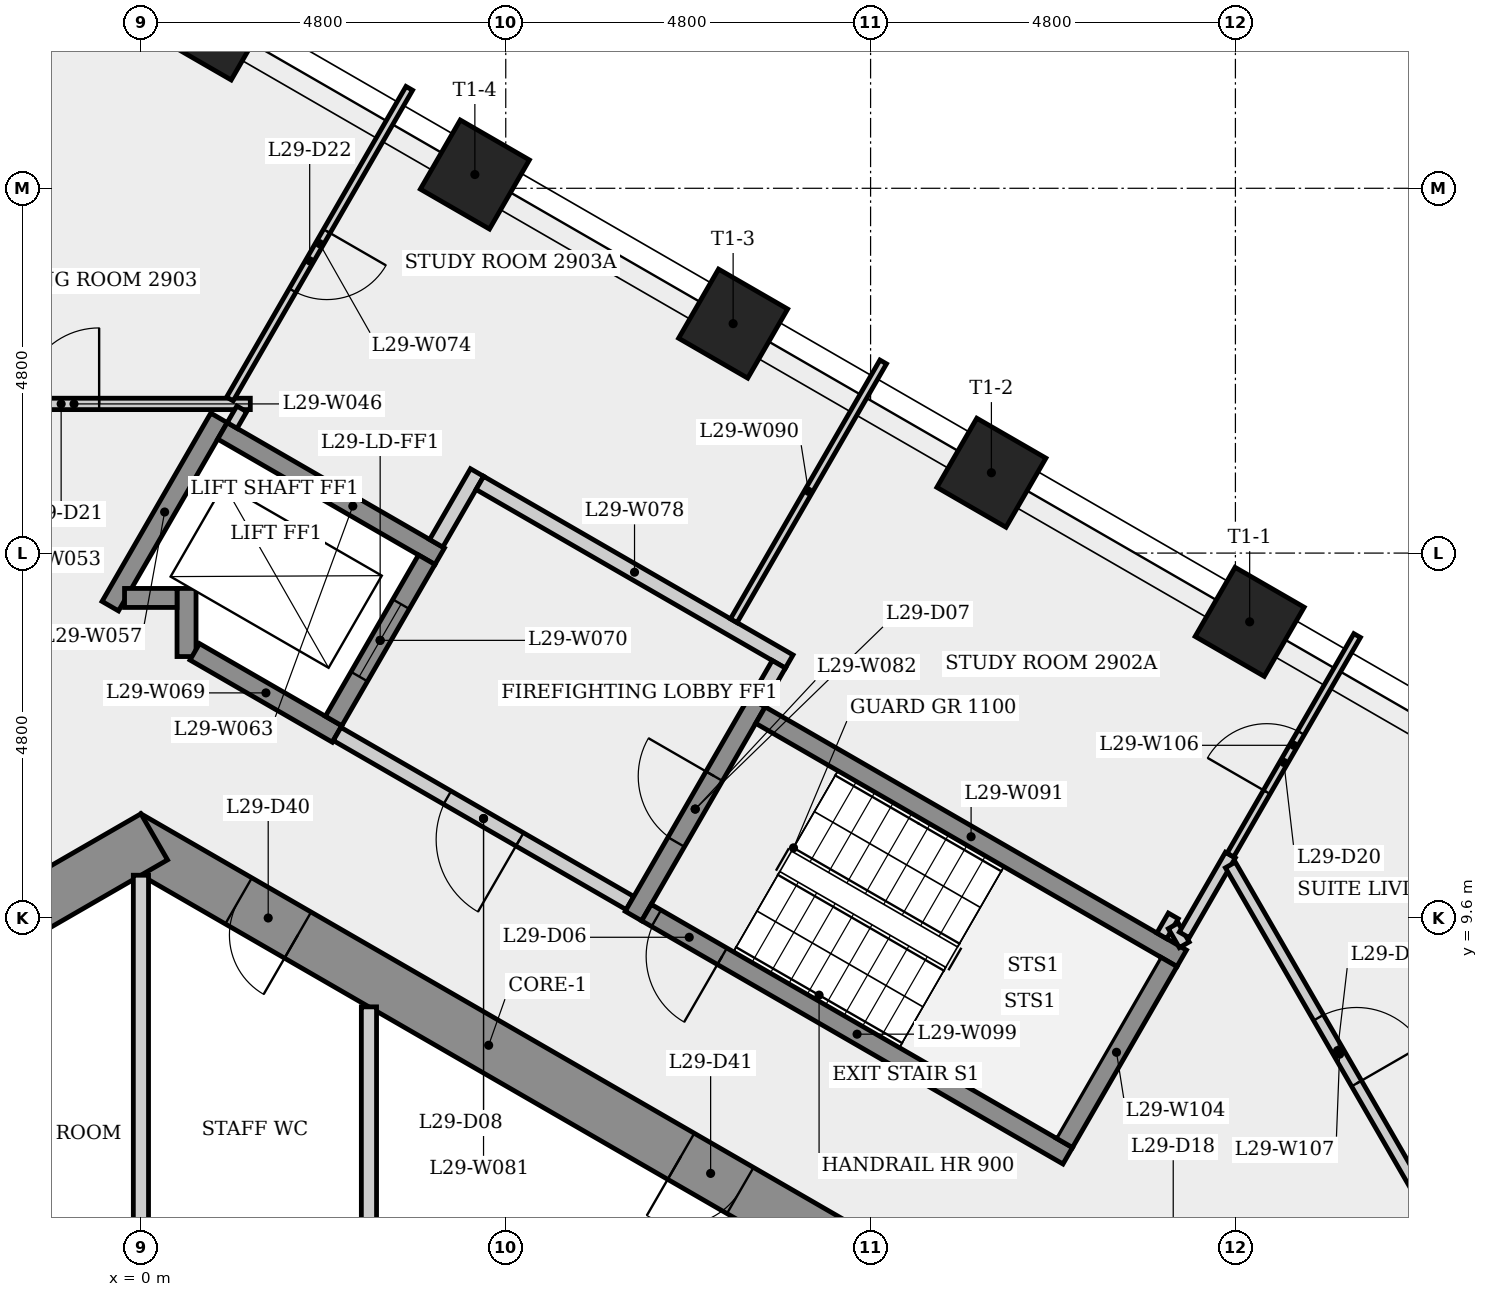
"""IFC4 building model, lengths in metres.
Left out: names, types, materials, properties, quantities, classifications, styles, units other than length and angle.
Written with IfcOpenShell. Run it as: python <this file> out.ifc"""

import sys

from ifc_helpers import new_model, si_unit, direction, frame, frame_2d, origin, origin_2d, place, context, subcontext, project, spatial, rectangle, extrude, element, fill, save


model = new_model("IFC4")
c1 = context("Model", 3, precision=1e-05, world=origin(), true_north=direction((0.0, 1.0)))
c2 = subcontext(c1, "Body", "Model", "MODEL_VIEW")
j1 = project(units=[si_unit("LENGTHUNIT", "METRE"), si_unit("PLANEANGLEUNIT", "RADIAN")], contexts=[c1])
p1 = place(None, origin())
s1 = spatial("IfcSite", under=j1, at=p1, CompositionType="ELEMENT")
p2 = place(p1, origin())
s2 = spatial("IfcBuilding", under=s1, at=p2, CompositionType="ELEMENT")
p3 = place(p2, frame((0.0, 0.0, 110.3)))
s3 = spatial("IfcBuildingStorey", under=s2, at=p3, CompositionType="ELEMENT", Elevation=110.3)
p4 = place(p3, frame((9.325, 5.182, 0.0), z_axis=(0.0, 0.0, 1.0), x_axis=(-0.866023993627, 0.500002442456, 0.0)))
e1 = element("IfcWall", 1, at=p4, inside=s3, PredefinedType="SHEAR", context=c2, shape_type="SweptSolid", body=[
    extrude(rectangle(XDim=10.97, YDim=0.7, at=frame_2d((5.485, 0.0))), origin(), (0.0, 0.0, 1.0), 3.4),
])
p5 = place(p4, frame((8.384, 0.0, 0.0)))
e2 = element("IfcOpeningElement", 2, at=p5, cuts=e1, PredefinedType="OPENING", context=c2, shape_type="SweptSolid", body=[
    extrude(rectangle(XDim=0.9, YDim=2.1, at=frame_2d((0.45, 1.05))), frame((0.0, 0.36, 0.0), z_axis=(0.0, -1.0, 0.0), x_axis=(1.0, 0.0, 0.0)), (0.0, 0.0, 1.0), 0.72),
])
p6 = place(p4, frame((1.663, 0.0, 0.0)))
e3 = element("IfcOpeningElement", 3, at=p6, cuts=e1, PredefinedType="OPENING", context=c2, shape_type="SweptSolid", body=[
    extrude(rectangle(XDim=0.9, YDim=2.1, at=frame_2d((0.45, 1.05))), frame((0.0, 0.36, 0.0), z_axis=(0.0, -1.0, 0.0), x_axis=(1.0, 0.0, 0.0)), (0.0, 0.0, 1.0), 0.72),
])
p7 = place(p3, frame((0.175, 10.667, 0.0), z_axis=(0.0, 0.0, 1.0), x_axis=(-0.866023993627, -0.500002442456, 0.0)))
e4 = element("IfcWall", 4, at=p7, inside=s3, PredefinedType="SHEAR", context=c2, shape_type="SweptSolid", body=[
    extrude(rectangle(XDim=10.97, YDim=0.7, at=frame_2d((5.485, 0.0))), origin(), (0.0, 0.0, 1.0), 3.4),
])
p8 = place(p7, frame((7.923, 0.0, 0.0)))
e5 = element("IfcOpeningElement", 5, at=p8, cuts=e4, PredefinedType="OPENING", context=c2, shape_type="SweptSolid", body=[
    extrude(rectangle(XDim=0.9, YDim=2.1, at=frame_2d((0.45, 1.05))), frame((0.0, 0.36, 0.0), z_axis=(0.0, -1.0, 0.0), x_axis=(1.0, 0.0, 0.0)), (0.0, 0.0, 1.0), 0.72),
])
p9 = place(p7, frame((1.802, 0.0, 0.0)))
e6 = element("IfcOpeningElement", 6, at=p9, cuts=e4, PredefinedType="OPENING", context=c2, shape_type="SweptSolid", body=[
    extrude(rectangle(XDim=0.9, YDim=2.1, at=frame_2d((0.45, 1.05))), frame((0.0, 0.36, 0.0), z_axis=(0.0, -1.0, 0.0), x_axis=(1.0, 0.0, 0.0)), (0.0, 0.0, 1.0), 0.72),
])
for number, where, z_axis, x_axis in (
    (7, (14.588, 13.495, 0.0), (0.0, 0.0, 1.0), (0.5, 0.866, 0.0)),
    (8, (11.189, 15.457, 0.0), (0.0, 0.0, 1.0), (0.5, 0.866, 0.0)),
    (9, (7.792, 17.419, 0.0), (0.0, 0.0, 1.0), (0.5, 0.866, 0.0)),
    (10, (4.394, 19.381, 0.0), (0.0, 0.0, 1.0), (0.5, 0.866, 0.0)),
    (11, (0.996, 21.343, 0.0), (0.0, 0.0, 1.0), (0.5, 0.866, 0.0)),
):
    element("IfcColumn", number, at=place(p3, frame(where, z_axis=z_axis, x_axis=x_axis)), inside=s3, PredefinedType="COLUMN", context=c2, shape_type="SweptSolid", body=[
        extrude(rectangle(XDim=1.05, YDim=1.05, at=origin_2d()), origin(), (0.0, 0.0, 1.0), 3.4),
    ])
p10 = place(p3, frame((-3.2, 16.363, 0.0), z_axis=(0.0, 0.0, 1.0), x_axis=(1.0, 0.0, 0.0)))
e12 = element("IfcWall", 12, at=p10, inside=s3, PredefinedType="PARTITIONING", context=c2, shape_type="SweptSolid", body=[
    extrude(rectangle(XDim=4.639, YDim=0.15, at=frame_2d((2.32, 0.0))), origin(), (0.0, 0.0, 1.0), 3.05),
])
p11 = place(p10, frame((1.65, 0.0, 0.0)))
e13 = element("IfcOpeningElement", 13, at=p11, cuts=e12, PredefinedType="OPENING", context=c2, shape_type="SweptSolid", body=[
    extrude(rectangle(XDim=1.0, YDim=2.1, at=frame_2d((0.5, 1.05))), frame((0.0, 0.085, 0.0), z_axis=(0.0, -1.0, 0.0), x_axis=(1.0, 0.0, 0.0)), (0.0, 0.0, 1.0), 0.17),
])
p12 = place(p3, frame((-0.403, 13.702, 0.0), z_axis=(0.0, 0.0, 1.0), x_axis=(0.499976111731, 0.866039195244, 0.0)))
e14 = element("IfcWall", 14, at=p12, inside=s3, PredefinedType="SHEAR", context=c2, shape_type="SweptSolid", body=[
    extrude(rectangle(XDim=2.861, YDim=0.25, at=frame_2d((1.43, 0.0))), origin(), (0.0, 0.0, 1.0), 3.05),
])
p13 = place(p3, frame((0.0, 10.161, 0.0), z_axis=(0.0, 0.0, 1.0), x_axis=(0.0, -1.0, 0.0)))
e15 = element("IfcWall", 15, at=p13, inside=s3, PredefinedType="PARTITIONING", context=c2, shape_type="SweptSolid", body=[
    extrude(rectangle(XDim=4.886, YDim=0.2, at=frame_2d((2.443, 0.0))), origin(), (0.0, 0.0, 1.0), 3.05),
])
p14 = place(p3, frame((0.6, 13.039, 0.0), z_axis=(0.0, 0.0, 1.0), x_axis=(0.0, 1.0, 0.0)))
e16 = element("IfcWall", 16, at=p14, inside=s3, PredefinedType="SHEAR", context=c2, shape_type="SweptSolid", body=[
    extrude(rectangle(XDim=0.896, YDim=0.25, at=frame_2d((0.448, 0.0))), origin(), (0.0, 0.0, 1.0), 3.05),
])
p15 = place(p3, frame((0.475, 13.81, 0.0), z_axis=(0.0, 0.0, 1.0), x_axis=(-1.0, 0.0, 0.0)))
e17 = element("IfcWall", 17, at=p15, inside=s3, PredefinedType="SHEAR", context=c2, shape_type="SweptSolid", body=[
    extrude(rectangle(XDim=0.691, YDim=0.25, at=frame_2d((0.345, 0.0))), origin(), (0.0, 0.0, 1.0), 3.4),
])
p16 = place(p3, frame((1.073, 16.008, 0.0), z_axis=(0.0, 0.0, 1.0), x_axis=(0.866040211805, -0.499974350878, 0.0)))
e18 = element("IfcWall", 18, at=p16, inside=s3, PredefinedType="SHEAR", context=c2, shape_type="SweptSolid", body=[
    extrude(rectangle(XDim=3.3, YDim=0.25, at=frame_2d((1.65, 0.0))), origin(), (0.0, 0.0, 1.0), 3.05),
])
p17 = place(p3, frame((1.327, 16.298, 0.0), z_axis=(0.0, 0.0, 1.0), x_axis=(-0.500502949238, -0.865734831114, 0.0)))
e19 = element("IfcWall", 19, at=p17, inside=s3, PredefinedType="PARTITIONING", context=c2, shape_type="SweptSolid", body=[
    extrude(rectangle(XDim=0.253, YDim=0.15, at=frame_2d((0.126, 0.0))), origin(), (0.0, 0.0, 1.0), 3.05),
])
p18 = place(p3, frame((2.581, 12.02, 0.0), z_axis=(0.0, 0.0, 1.0), x_axis=(-0.86603892542, 0.499976579108, 0.0)))
e20 = element("IfcWall", 20, at=p18, inside=s3, PredefinedType="SHEAR", context=c2, shape_type="SweptSolid", body=[
    extrude(rectangle(XDim=2.162, YDim=0.25, at=frame_2d((1.081, 0.0))), origin(), (0.0, 0.0, 1.0), 3.05),
])
p19 = place(p3, frame((2.535, 12.191, 0.0), z_axis=(0.0, 0.0, 1.0), x_axis=(0.500061746146, 0.865989751695, 0.0)))
e21 = element("IfcWall", 21, at=p19, inside=s3, PredefinedType="SHEAR", context=c2, shape_type="SweptSolid", body=[
    extrude(rectangle(XDim=2.45, YDim=0.25, at=frame_2d((1.225, 0.0))), origin(), (0.0, 0.0, 1.0), 3.4),
])
p20 = place(p19, frame((0.675, 0.0, 0.0)))
e22 = element("IfcOpeningElement", 22, at=p20, cuts=e21, PredefinedType="OPENING", context=c2, shape_type="SweptSolid", body=[
    extrude(rectangle(XDim=1.1, YDim=2.1, at=frame_2d((0.55, 1.05))), frame((0.0, 0.135, 0.0), z_axis=(0.0, -1.0, 0.0), x_axis=(1.0, 0.0, 0.0)), (0.0, 0.0, 1.0), 0.27),
])
p21 = place(p3, frame((3.0, 8.429, 0.0), z_axis=(0.0, 0.0, 1.0), x_axis=(0.0, -1.0, 0.0)))
e23 = element("IfcWall", 23, at=p21, inside=s3, PredefinedType="PARTITIONING", context=c2, shape_type="SweptSolid", body=[
    extrude(rectangle(XDim=3.154, YDim=0.2, at=frame_2d((1.577, 0.0))), origin(), (0.0, 0.0, 1.0), 3.05),
])
p22 = place(p3, frame((3.531, 20.515, 0.0), z_axis=(0.0, 0.0, 1.0), x_axis=(-0.500022469165, -0.866012430818, 0.0)))
e24 = element("IfcWall", 24, at=p22, inside=s3, PredefinedType="PARTITIONING", context=c2, shape_type="SweptSolid", body=[
    extrude(rectangle(XDim=4.719, YDim=0.1, at=frame_2d((2.36, 0.0))), origin(), (0.0, 0.0, 1.0), 3.05),
])
p23 = place(p22, frame((2.17, 0.0, 0.0)))
e25 = element("IfcOpeningElement", 25, at=p23, cuts=e24, PredefinedType="OPENING", context=c2, shape_type="SweptSolid", body=[
    extrude(rectangle(XDim=0.9, YDim=2.1, at=frame_2d((0.45, 1.05))), frame((0.0, 0.06, 0.0), z_axis=(0.0, -1.0, 0.0), x_axis=(1.0, 0.0, 0.0)), (0.0, 0.0, 1.0), 0.12),
])
p24 = place(p3, frame((3.885, 14.529, 0.0), z_axis=(0.0, 0.0, 1.0), x_axis=(0.499997628298, 0.866026773083, 0.0)))
e26 = element("IfcWall", 26, at=p24, inside=s3, PredefinedType="PARTITIONING", context=c2, shape_type="SweptSolid", body=[
    extrude(rectangle(XDim=1.075, YDim=0.2, at=frame_2d((0.538, 0.0))), origin(), (0.0, 0.0, 1.0), 3.05),
])
p25 = place(p3, frame((4.459, 15.323, 0.0), z_axis=(0.0, 0.0, 1.0), x_axis=(0.866016039709, -0.500016218704, 0.0)))
e27 = element("IfcWall", 27, at=p25, inside=s3, PredefinedType="PARTITIONING", context=c2, shape_type="SweptSolid", body=[
    extrude(rectangle(XDim=4.7, YDim=0.2, at=frame_2d((2.35, 0.0))), origin(), (0.0, 0.0, 1.0), 3.05),
])
p26 = place(p3, frame((6.435, 9.795, 0.0), z_axis=(0.0, 0.0, 1.0), x_axis=(-0.866012907634, 0.500021643343, 0.0)))
e28 = element("IfcWall", 28, at=p26, inside=s3, PredefinedType="PARTITIONING", context=c2, shape_type="SweptSolid", body=[
    extrude(rectangle(XDim=4.45, YDim=0.2, at=frame_2d((2.225, 0.0))), origin(), (0.0, 0.0, 1.0), 3.05),
])
p27 = place(p26, frame((1.675, 0.0, 0.0)))
e29 = element("IfcOpeningElement", 29, at=p27, cuts=e28, PredefinedType="OPENING", context=c2, shape_type="SweptSolid", body=[
    extrude(rectangle(XDim=1.1, YDim=2.1, at=frame_2d((0.55, 1.05))), frame((0.0, 0.11, 0.0), z_axis=(0.0, -1.0, 0.0), x_axis=(1.0, 0.0, 0.0)), (0.0, 0.0, 1.0), 0.22),
])
p28 = place(p3, frame((6.48, 9.624, 0.0), z_axis=(0.0, 0.0, 1.0), x_axis=(0.500017246033, 0.866015446554, 0.0)))
e30 = element("IfcWall", 30, at=p28, inside=s3, PredefinedType="SHEAR", context=c2, shape_type="SweptSolid", body=[
    extrude(rectangle(XDim=3.25, YDim=0.25, at=frame_2d((1.625, 0.0))), origin(), (0.0, 0.0, 1.0), 3.05),
])
p29 = place(p28, frame((1.125, 0.0, 0.0)))
e31 = element("IfcOpeningElement", 31, at=p29, cuts=e30, PredefinedType="OPENING", context=c2, shape_type="SweptSolid", body=[
    extrude(rectangle(XDim=1.0, YDim=2.1, at=frame_2d((0.5, 1.05))), frame((0.0, 0.135, 0.0), z_axis=(0.0, -1.0, 0.0), x_axis=(1.0, 0.0, 0.0)), (0.0, 0.0, 1.0), 0.27),
])
p30 = place(p3, frame((7.8, 13.51, 0.0), z_axis=(0.0, 0.0, 1.0), x_axis=(0.499985832843, 0.866033583042, 0.0)))
e32 = element("IfcWall", 32, at=p30, inside=s3, PredefinedType="PARTITIONING", context=c2, shape_type="SweptSolid", body=[
    extrude(rectangle(XDim=3.932, YDim=0.1, at=frame_2d((1.966, 0.0))), origin(), (0.0, 0.0, 1.0), 3.05),
])
p31 = place(p3, frame((8.151, 12.268, 0.0), z_axis=(0.0, 0.0, 1.0), x_axis=(0.866025499775, -0.499999833739, 0.0)))
e33 = element("IfcWall", 33, at=p31, inside=s3, PredefinedType="SHEAR", context=c2, shape_type="SweptSolid", body=[
    extrude(rectangle(XDim=6.4, YDim=0.25, at=frame_2d((3.2, 0.0))), origin(), (0.0, 0.0, 1.0), 3.05),
])
p32 = place(p3, frame((8.393, 12.937, 0.0), z_axis=(0.0, 0.0, 1.0), x_axis=(-0.500065409566, -0.86598763626, 0.0)))
e34 = element("IfcWall", 34, at=p32, inside=s3, PredefinedType="PARTITIONING", context=c2, shape_type="SweptSolid", body=[
    extrude(rectangle(XDim=0.575, YDim=0.2, at=frame_2d((0.288, 0.0))), origin(), (0.0, 0.0, 1.0), 3.05),
])
p33 = place(p3, frame((12.194, 6.47, 0.0), z_axis=(0.0, 0.0, 1.0), x_axis=(-0.866025499775, 0.499999833739, 0.0)))
e35 = element("IfcWall", 35, at=p33, inside=s3, PredefinedType="SHEAR", context=c2, shape_type="SweptSolid", body=[
    extrude(rectangle(XDim=6.4, YDim=0.25, at=frame_2d((3.2, 0.0))), origin(), (0.0, 0.0, 1.0), 3.05),
])
p34 = place(p33, frame((5.25, 0.0, 0.0)))
e36 = element("IfcOpeningElement", 36, at=p34, cuts=e35, PredefinedType="OPENING", context=c2, shape_type="SweptSolid", body=[
    extrude(rectangle(XDim=1.0, YDim=2.1, at=frame_2d((0.5, 1.05))), frame((0.0, 0.135, 0.0), z_axis=(0.0, -1.0, 0.0), x_axis=(1.0, 0.0, 0.0)), (0.0, 0.0, 1.0), 0.27),
])
p35 = place(p3, frame((13.431, 9.364, 0.0), z_axis=(0.0, 0.0, 1.0), x_axis=(0.49995513091, 0.866051307416, 0.0)))
e37 = element("IfcWall", 37, at=p35, inside=s3, PredefinedType="PARTITIONING", context=c2, shape_type="SweptSolid", body=[
    extrude(rectangle(XDim=0.303, YDim=0.15, at=frame_2d((0.151, 0.0))), origin(), (0.0, 0.0, 1.0), 3.05),
])
p36 = place(p3, frame((13.583, 9.496, 0.0), z_axis=(0.0, 0.0, 1.0), x_axis=(0.499868889286, -0.866101087359, 0.0)))
e38 = element("IfcWall", 38, at=p36, inside=s3, PredefinedType="PARTITIONING", context=c2, shape_type="SweptSolid", body=[
    extrude(rectangle(XDim=0.289, YDim=0.15, at=frame_2d((0.144, 0.0))), origin(), (0.0, 0.0, 1.0), 3.05),
])
p37 = place(p3, frame((13.523, 9.022, 0.0), z_axis=(0.0, 0.0, 1.0), x_axis=(-0.500034990121, -0.866005201286, 0.0)))
e39 = element("IfcWall", 39, at=p37, inside=s3, PredefinedType="SHEAR", context=c2, shape_type="SweptSolid", body=[
    extrude(rectangle(XDim=2.75, YDim=0.25, at=frame_2d((1.375, 0.0))), origin(), (0.0, 0.0, 1.0), 3.05),
])
p38 = place(p3, frame((13.727, 9.376, 0.0), z_axis=(0.0, 0.0, 1.0), x_axis=(0.500012742938, 0.866018046521, 0.0)))
e40 = element("IfcWall", 40, at=p38, inside=s3, PredefinedType="PARTITIONING", context=c2, shape_type="SweptSolid", body=[
    extrude(rectangle(XDim=1.213, YDim=0.15, at=frame_2d((0.607, 0.0))), origin(), (0.0, 0.0, 1.0), 3.05),
])
p39 = place(p3, frame((14.334, 10.427, 0.0), z_axis=(0.0, 0.0, 1.0), x_axis=(0.499997052475, 0.866027105532, 0.0)))
e41 = element("IfcWall", 41, at=p39, inside=s3, PredefinedType="PARTITIONING", context=c2, shape_type="SweptSolid", body=[
    extrude(rectangle(XDim=3.335, YDim=0.1, at=frame_2d((1.667, 0.0))), origin(), (0.0, 0.0, 1.0), 3.05),
])
p40 = place(p39, frame((0.957, 0.0, 0.0)))
e42 = element("IfcOpeningElement", 42, at=p40, cuts=e41, PredefinedType="OPENING", context=c2, shape_type="SweptSolid", body=[
    extrude(rectangle(XDim=0.9, YDim=2.1, at=frame_2d((0.45, 1.05))), frame((0.0, 0.06, 0.0), z_axis=(0.0, -1.0, 0.0), x_axis=(1.0, 0.0, 0.0)), (0.0, 0.0, 1.0), 0.12),
])
p41 = place(p3, frame((14.334, 10.297, 0.0), z_axis=(0.0, 0.0, 1.0), x_axis=(0.500006661652, -0.866021557644, 0.0)))
e43 = element("IfcWall", 43, at=p41, inside=s3, PredefinedType="PARTITIONING", context=c2, shape_type="SweptSolid", body=[
    extrude(rectangle(XDim=5.75, YDim=0.15, at=frame_2d((2.875, 0.0))), origin(), (0.0, 0.0, 1.0), 3.05),
])
p42 = place(p41, frame((2.32, 0.0, 0.0)))
e44 = element("IfcOpeningElement", 44, at=p42, cuts=e43, PredefinedType="OPENING", context=c2, shape_type="SweptSolid", body=[
    extrude(rectangle(XDim=1.0, YDim=2.1, at=frame_2d((0.5, 1.05))), frame((0.0, 0.085, 0.0), z_axis=(0.0, -1.0, 0.0), x_axis=(1.0, 0.0, 0.0)), (0.0, 0.0, 1.0), 0.17),
])
p43 = place(p34, origin())
e45 = element("IfcDoor", 45, at=p43, inside=s3, OperationType="SINGLE_SWING_LEFT", PredefinedType="DOOR", context=c2, shape_type="SweptSolid", body=[
    extrude(rectangle(XDim=1.0, YDim=2.1, at=frame_2d((0.5, 1.05))), frame((0.0, 0.025, 0.0), z_axis=(0.0, -1.0, 0.0), x_axis=(1.0, 0.0, 0.0)), (0.0, 0.0, 1.0), 0.05),
])
fill(e36, e45)
p44 = place(p29, origin())
e46 = element("IfcDoor", 46, at=p44, inside=s3, OperationType="SINGLE_SWING_RIGHT", PredefinedType="DOOR", context=c2, shape_type="SweptSolid", body=[
    extrude(rectangle(XDim=1.0, YDim=2.1, at=frame_2d((0.5, 1.05))), frame((0.0, 0.025, 0.0), z_axis=(0.0, -1.0, 0.0), x_axis=(1.0, 0.0, 0.0)), (0.0, 0.0, 1.0), 0.05),
])
fill(e31, e46)
p45 = place(p27, origin())
e47 = element("IfcDoor", 47, at=p45, inside=s3, OperationType="SINGLE_SWING_LEFT", PredefinedType="DOOR", context=c2, shape_type="SweptSolid", body=[
    extrude(rectangle(XDim=1.1, YDim=2.1, at=frame_2d((0.55, 1.05))), frame((0.0, 0.025, 0.0), z_axis=(0.0, -1.0, 0.0), x_axis=(1.0, 0.0, 0.0)), (0.0, 0.0, 1.0), 0.05),
])
fill(e29, e47)
p46 = place(p20, origin())
e48 = element("IfcDoor", 48, at=p46, inside=s3, OperationType="SLIDING_TO_LEFT", PredefinedType="DOOR", context=c2, shape_type="SweptSolid", body=[
    extrude(rectangle(XDim=1.1, YDim=2.1, at=frame_2d((0.55, 1.05))), frame((0.0, 0.025, 0.0), z_axis=(0.0, -1.0, 0.0), x_axis=(1.0, 0.0, 0.0)), (0.0, 0.0, 1.0), 0.05),
])
fill(e22, e48)
p47 = place(p42, origin())
e49 = element("IfcDoor", 49, at=p47, inside=s3, OperationType="SINGLE_SWING_RIGHT", PredefinedType="DOOR", context=c2, shape_type="SweptSolid", body=[
    extrude(rectangle(XDim=1.0, YDim=2.1, at=frame_2d((0.5, 1.05))), frame((0.0, 0.025, 0.0), z_axis=(0.0, -1.0, 0.0), x_axis=(1.0, 0.0, 0.0)), (0.0, 0.0, 1.0), 0.05),
])
fill(e44, e49)
p48 = place(p40, origin())
e50 = element("IfcDoor", 50, at=p48, inside=s3, OperationType="SINGLE_SWING_LEFT", PredefinedType="DOOR", context=c2, shape_type="SweptSolid", body=[
    extrude(rectangle(XDim=0.9, YDim=2.1, at=frame_2d((0.45, 1.05))), frame((0.0, 0.025, 0.0), z_axis=(0.0, -1.0, 0.0), x_axis=(1.0, 0.0, 0.0)), (0.0, 0.0, 1.0), 0.05),
])
fill(e42, e50)
p49 = place(p11, origin())
e51 = element("IfcDoor", 51, at=p49, inside=s3, OperationType="SINGLE_SWING_RIGHT", PredefinedType="DOOR", context=c2, shape_type="SweptSolid", body=[
    extrude(rectangle(XDim=1.0, YDim=2.1, at=frame_2d((0.5, 1.05))), frame((0.0, 0.025, 0.0), z_axis=(0.0, -1.0, 0.0), x_axis=(1.0, 0.0, 0.0)), (0.0, 0.0, 1.0), 0.05),
])
fill(e13, e51)
p50 = place(p23, origin())
e52 = element("IfcDoor", 52, at=p50, inside=s3, OperationType="SINGLE_SWING_LEFT", PredefinedType="DOOR", context=c2, shape_type="SweptSolid", body=[
    extrude(rectangle(XDim=0.9, YDim=2.1, at=frame_2d((0.45, 1.05))), frame((0.0, 0.025, 0.0), z_axis=(0.0, -1.0, 0.0), x_axis=(1.0, 0.0, 0.0)), (0.0, 0.0, 1.0), 0.05),
])
fill(e25, e52)
p51 = place(p5, origin())
e53 = element("IfcDoor", 53, at=p51, inside=s3, OperationType="SINGLE_SWING_LEFT", PredefinedType="DOOR", context=c2, shape_type="SweptSolid", body=[
    extrude(rectangle(XDim=0.9, YDim=2.1, at=frame_2d((0.45, 1.05))), frame((0.0, 0.025, 0.0), z_axis=(0.0, -1.0, 0.0), x_axis=(1.0, 0.0, 0.0)), (0.0, 0.0, 1.0), 0.05),
])
fill(e2, e53)
p52 = place(p6, origin())
e54 = element("IfcDoor", 54, at=p52, inside=s3, OperationType="SINGLE_SWING_RIGHT", PredefinedType="DOOR", context=c2, shape_type="SweptSolid", body=[
    extrude(rectangle(XDim=0.9, YDim=2.1, at=frame_2d((0.45, 1.05))), frame((0.0, 0.025, 0.0), z_axis=(0.0, -1.0, 0.0), x_axis=(1.0, 0.0, 0.0)), (0.0, 0.0, 1.0), 0.05),
])
fill(e3, e54)
save(model, sys.argv[1])
